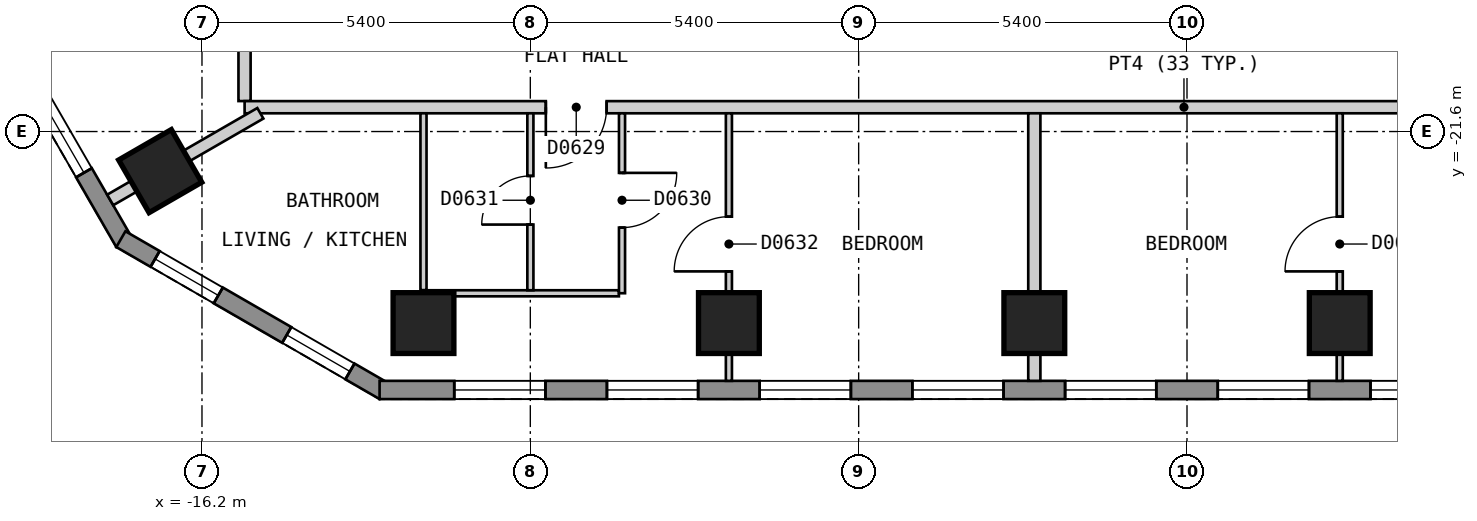
"""IFC4 building model, lengths in metres.
Left out: names, types, materials, properties, quantities, classifications, styles, units other than length and angle.
Written with IfcOpenShell. Run it as: python <this file> out.ifc"""

import sys

from ifc_helpers import new_model, si_unit, direction, frame, frame_2d, origin, origin_2d, place, context, subcontext, project, spatial, polyline, rectangle, outline, extrude, element, fill, save


model = new_model("IFC4")
c1 = context("Model", 3, precision=1e-05, world=origin(), true_north=direction((0.0, 1.0)))
c2 = subcontext(c1, "Body", "Model", "MODEL_VIEW")
j1 = project(units=[si_unit("LENGTHUNIT", "METRE"), si_unit("PLANEANGLEUNIT", "RADIAN")], contexts=[c1])
p1 = place(None, origin())
s1 = spatial("IfcSite", under=j1, at=p1, CompositionType="ELEMENT")
p2 = place(p1, origin())
s2 = spatial("IfcBuilding", under=s1, at=p2, CompositionType="ELEMENT")
p3 = place(p2, frame((0.0, 0.0, 81.0)))
s3 = spatial("IfcBuildingStorey", under=s2, at=p3, CompositionType="ELEMENT", Elevation=81.0)
for number, where, z_axis, x_axis in (
    (1, (-16.887, -22.251, 0.0), (0.0, 0.0, 1.0), (0.5, -0.866, 0.0)),
    (2, (-12.557, -24.75, 0.0), (0.0, 0.0, 1.0), (1.0, 0.0, 0.0)),
    (3, (-7.534, -24.75, 0.0), (0.0, 0.0, 1.0), (1.0, 0.0, 0.0)),
    (4, (-2.511, -24.75, 0.0), (0.0, 0.0, 1.0), (1.0, 0.0, 0.0)),
    (5, (2.512, -24.75, 0.0), (0.0, 0.0, 1.0), (1.0, 0.0, 0.0)),
):
    element("IfcColumn", number, at=place(p3, frame(where, z_axis=z_axis, x_axis=x_axis)), inside=s3, PredefinedType="COLUMN", context=c2, shape_type="SweptSolid", body=[
        extrude(rectangle(XDim=1.0, YDim=1.0, at=origin_2d()), origin(), (0.0, 0.0, 1.0), 3.0),
    ])
p4 = place(p3, frame((-29.027, -3.425, 0.0), z_axis=(0.0, 0.0, 1.0), x_axis=(0.500035407905, -0.866004960056, 0.0)))
e6 = element("IfcWall", 6, at=p4, inside=s3, PredefinedType="SOLIDWALL", context=c2, shape_type="SweptSolid", body=[
    extrude(outline(polyline([(0.0, -0.15), (23.094, -0.15), (23.014, 0.15), (0.08, 0.15), (0.0, -0.15)])), origin(), (0.0, 0.0, 1.0), 2.7),
])
p5 = place(p4, frame((1.324, 0.0, 0.15)))
e7 = element("IfcOpeningElement", 7, at=p5, cuts=e6, PredefinedType="OPENING", context=c2, shape_type="SweptSolid", body=[
    extrude(rectangle(XDim=1.5, YDim=2.1, at=frame_2d((0.75, 1.05))), frame((0.0, 0.16, 0.0), z_axis=(0.0, -1.0, 0.0), x_axis=(1.0, 0.0, 0.0)), (0.0, 0.0, 1.0), 0.32),
])
p6 = place(p4, frame((4.031, 0.0, 0.15)))
e8 = element("IfcOpeningElement", 8, at=p6, cuts=e6, PredefinedType="OPENING", context=c2, shape_type="SweptSolid", body=[
    extrude(rectangle(XDim=1.5, YDim=2.1, at=frame_2d((0.75, 1.05))), frame((0.0, 0.16, 0.0), z_axis=(0.0, -1.0, 0.0), x_axis=(1.0, 0.0, 0.0)), (0.0, 0.0, 1.0), 0.32),
])
p7 = place(p4, frame((6.737, 0.0, 0.15)))
e9 = element("IfcOpeningElement", 9, at=p7, cuts=e6, PredefinedType="OPENING", context=c2, shape_type="SweptSolid", body=[
    extrude(rectangle(XDim=1.5, YDim=2.1, at=frame_2d((0.75, 1.05))), frame((0.0, 0.16, 0.0), z_axis=(0.0, -1.0, 0.0), x_axis=(1.0, 0.0, 0.0)), (0.0, 0.0, 1.0), 0.32),
])
p8 = place(p4, frame((9.444, 0.0, 0.15)))
e10 = element("IfcOpeningElement", 10, at=p8, cuts=e6, PredefinedType="OPENING", context=c2, shape_type="SweptSolid", body=[
    extrude(rectangle(XDim=1.5, YDim=2.1, at=frame_2d((0.75, 1.05))), frame((0.0, 0.16, 0.0), z_axis=(0.0, -1.0, 0.0), x_axis=(1.0, 0.0, 0.0)), (0.0, 0.0, 1.0), 0.32),
])
p9 = place(p4, frame((12.151, 0.0, 0.15)))
e11 = element("IfcOpeningElement", 11, at=p9, cuts=e6, PredefinedType="OPENING", context=c2, shape_type="SweptSolid", body=[
    extrude(rectangle(XDim=1.5, YDim=2.1, at=frame_2d((0.75, 1.05))), frame((0.0, 0.16, 0.0), z_axis=(0.0, -1.0, 0.0), x_axis=(1.0, 0.0, 0.0)), (0.0, 0.0, 1.0), 0.32),
])
p10 = place(p4, frame((14.857, 0.0, 0.15)))
e12 = element("IfcOpeningElement", 12, at=p10, cuts=e6, PredefinedType="OPENING", context=c2, shape_type="SweptSolid", body=[
    extrude(rectangle(XDim=1.5, YDim=2.1, at=frame_2d((0.75, 1.05))), frame((0.0, 0.16, 0.0), z_axis=(0.0, -1.0, 0.0), x_axis=(1.0, 0.0, 0.0)), (0.0, 0.0, 1.0), 0.32),
])
p11 = place(p4, frame((17.564, 0.0, 0.15)))
e13 = element("IfcOpeningElement", 13, at=p11, cuts=e6, PredefinedType="OPENING", context=c2, shape_type="SweptSolid", body=[
    extrude(rectangle(XDim=1.5, YDim=2.1, at=frame_2d((0.75, 1.05))), frame((0.0, 0.16, 0.0), z_axis=(0.0, -1.0, 0.0), x_axis=(1.0, 0.0, 0.0)), (0.0, 0.0, 1.0), 0.32),
])
p12 = place(p4, frame((20.27, 0.0, 0.15)))
e14 = element("IfcOpeningElement", 14, at=p12, cuts=e6, PredefinedType="OPENING", context=c2, shape_type="SweptSolid", body=[
    extrude(rectangle(XDim=1.5, YDim=2.1, at=frame_2d((0.75, 1.05))), frame((0.0, 0.16, 0.0), z_axis=(0.0, -1.0, 0.0), x_axis=(1.0, 0.0, 0.0)), (0.0, 0.0, 1.0), 0.32),
])
p13 = place(p3, frame((-17.534, -23.37, 0.0), z_axis=(0.0, 0.0, 1.0), x_axis=(0.866010750942, -0.50002537861, 0.0)))
e15 = element("IfcWall", 15, at=p13, inside=s3, PredefinedType="SOLIDWALL", context=c2, shape_type="SweptSolid", body=[
    extrude(outline(polyline([(0.0, -0.15), (5.0, -0.15), (4.919, 0.15), (0.08, 0.15), (0.0, -0.15)])), origin(), (0.0, 0.0, 1.0), 2.7),
])
p14 = place(p13, frame((0.65, 0.0, 0.15)))
e16 = element("IfcOpeningElement", 16, at=p14, cuts=e15, PredefinedType="OPENING", context=c2, shape_type="SweptSolid", body=[
    extrude(rectangle(XDim=1.2, YDim=2.1, at=frame_2d((0.6, 1.05))), frame((0.0, 0.16, 0.0), z_axis=(0.0, -1.0, 0.0), x_axis=(1.0, 0.0, 0.0)), (0.0, 0.0, 1.0), 0.32),
])
p15 = place(p13, frame((3.15, 0.0, 0.15)))
e17 = element("IfcOpeningElement", 17, at=p15, cuts=e15, PredefinedType="OPENING", context=c2, shape_type="SweptSolid", body=[
    extrude(rectangle(XDim=1.2, YDim=2.1, at=frame_2d((0.6, 1.05))), frame((0.0, 0.16, 0.0), z_axis=(0.0, -1.0, 0.0), x_axis=(1.0, 0.0, 0.0)), (0.0, 0.0, 1.0), 0.32),
])
p16 = place(p3, frame((-13.279, -25.85, 0.0), z_axis=(0.0, 0.0, 1.0), x_axis=(1.0, 0.0, 0.0)))
e18 = element("IfcWall", 18, at=p16, inside=s3, PredefinedType="SOLIDWALL", context=c2, shape_type="SweptSolid", body=[
    extrude(outline(polyline([(0.0, -0.15), (26.558, -0.15), (26.478, 0.15), (0.08, 0.15), (0.0, -0.15)])), origin(), (0.0, 0.0, 1.0), 2.7),
])
p17 = place(p16, frame((1.228, 0.0, 0.15)))
e19 = element("IfcOpeningElement", 19, at=p17, cuts=e18, PredefinedType="OPENING", context=c2, shape_type="SweptSolid", body=[
    extrude(rectangle(XDim=1.5, YDim=2.1, at=frame_2d((0.75, 1.05))), frame((0.0, 0.16, 0.0), z_axis=(0.0, -1.0, 0.0), x_axis=(1.0, 0.0, 0.0)), (0.0, 0.0, 1.0), 0.32),
])
p18 = place(p16, frame((3.739, 0.0, 0.15)))
e20 = element("IfcOpeningElement", 20, at=p18, cuts=e18, PredefinedType="OPENING", context=c2, shape_type="SweptSolid", body=[
    extrude(rectangle(XDim=1.5, YDim=2.1, at=frame_2d((0.75, 1.05))), frame((0.0, 0.16, 0.0), z_axis=(0.0, -1.0, 0.0), x_axis=(1.0, 0.0, 0.0)), (0.0, 0.0, 1.0), 0.32),
])
p19 = place(p16, frame((6.251, 0.0, 0.15)))
e21 = element("IfcOpeningElement", 21, at=p19, cuts=e18, PredefinedType="OPENING", context=c2, shape_type="SweptSolid", body=[
    extrude(rectangle(XDim=1.5, YDim=2.1, at=frame_2d((0.75, 1.05))), frame((0.0, 0.16, 0.0), z_axis=(0.0, -1.0, 0.0), x_axis=(1.0, 0.0, 0.0)), (0.0, 0.0, 1.0), 0.32),
])
p20 = place(p16, frame((8.762, 0.0, 0.15)))
e22 = element("IfcOpeningElement", 22, at=p20, cuts=e18, PredefinedType="OPENING", context=c2, shape_type="SweptSolid", body=[
    extrude(rectangle(XDim=1.5, YDim=2.1, at=frame_2d((0.75, 1.05))), frame((0.0, 0.16, 0.0), z_axis=(0.0, -1.0, 0.0), x_axis=(1.0, 0.0, 0.0)), (0.0, 0.0, 1.0), 0.32),
])
p21 = place(p16, frame((11.274, 0.0, 0.15)))
e23 = element("IfcOpeningElement", 23, at=p21, cuts=e18, PredefinedType="OPENING", context=c2, shape_type="SweptSolid", body=[
    extrude(rectangle(XDim=1.5, YDim=2.1, at=frame_2d((0.75, 1.05))), frame((0.0, 0.16, 0.0), z_axis=(0.0, -1.0, 0.0), x_axis=(1.0, 0.0, 0.0)), (0.0, 0.0, 1.0), 0.32),
])
p22 = place(p16, frame((13.785, 0.0, 0.15)))
e24 = element("IfcOpeningElement", 24, at=p22, cuts=e18, PredefinedType="OPENING", context=c2, shape_type="SweptSolid", body=[
    extrude(rectangle(XDim=1.5, YDim=2.1, at=frame_2d((0.75, 1.05))), frame((0.0, 0.16, 0.0), z_axis=(0.0, -1.0, 0.0), x_axis=(1.0, 0.0, 0.0)), (0.0, 0.0, 1.0), 0.32),
])
p23 = place(p16, frame((16.297, 0.0, 0.15)))
e25 = element("IfcOpeningElement", 25, at=p23, cuts=e18, PredefinedType="OPENING", context=c2, shape_type="SweptSolid", body=[
    extrude(rectangle(XDim=1.5, YDim=2.1, at=frame_2d((0.75, 1.05))), frame((0.0, 0.16, 0.0), z_axis=(0.0, -1.0, 0.0), x_axis=(1.0, 0.0, 0.0)), (0.0, 0.0, 1.0), 0.32),
])
p24 = place(p16, frame((18.808, 0.0, 0.15)))
e26 = element("IfcOpeningElement", 26, at=p24, cuts=e18, PredefinedType="OPENING", context=c2, shape_type="SweptSolid", body=[
    extrude(rectangle(XDim=1.5, YDim=2.1, at=frame_2d((0.75, 1.05))), frame((0.0, 0.16, 0.0), z_axis=(0.0, -1.0, 0.0), x_axis=(1.0, 0.0, 0.0)), (0.0, 0.0, 1.0), 0.32),
])
p25 = place(p16, frame((21.32, 0.0, 0.15)))
e27 = element("IfcOpeningElement", 27, at=p25, cuts=e18, PredefinedType="OPENING", context=c2, shape_type="SweptSolid", body=[
    extrude(rectangle(XDim=1.5, YDim=2.1, at=frame_2d((0.75, 1.05))), frame((0.0, 0.16, 0.0), z_axis=(0.0, -1.0, 0.0), x_axis=(1.0, 0.0, 0.0)), (0.0, 0.0, 1.0), 0.32),
])
p26 = place(p16, frame((23.831, 0.0, 0.15)))
e28 = element("IfcOpeningElement", 28, at=p26, cuts=e18, PredefinedType="OPENING", context=c2, shape_type="SweptSolid", body=[
    extrude(rectangle(XDim=1.5, YDim=2.1, at=frame_2d((0.75, 1.05))), frame((0.0, 0.16, 0.0), z_axis=(0.0, -1.0, 0.0), x_axis=(1.0, 0.0, 0.0)), (0.0, 0.0, 1.0), 0.32),
])
p27 = place(p3, frame((-15.5, -16.501, 0.0), z_axis=(0.0, 0.0, 1.0), x_axis=(0.0, -1.0, 0.0)))
e29 = element("IfcWall", 29, at=p27, inside=s3, PredefinedType="PARTITIONING", context=c2, shape_type="SweptSolid", body=[
    extrude(rectangle(XDim=4.598, YDim=0.2, at=frame_2d((2.299, 0.0))), origin(), (0.0, 0.0, 1.0), 2.7),
])
p28 = place(p3, frame((-15.499, -21.2, 0.0), z_axis=(0.0, 0.0, 1.0), x_axis=(1.0, 0.0, 0.0)))
e30 = element("IfcWall", 30, at=p28, inside=s3, PredefinedType="PARTITIONING", context=c2, shape_type="SweptSolid", body=[
    extrude(rectangle(XDim=30.898, YDim=0.2, at=frame_2d((15.449, 0.0))), origin(), (0.0, 0.0, 1.0), 2.7),
])
p29 = place(p28, frame((4.954, 0.0, 0.0)))
e31 = element("IfcOpeningElement", 31, at=p29, cuts=e30, PredefinedType="OPENING", context=c2, shape_type="SweptSolid", body=[
    extrude(rectangle(XDim=1.0, YDim=2.1, at=frame_2d((0.5, 1.05))), frame((0.0, 0.11, 0.0), z_axis=(0.0, -1.0, 0.0), x_axis=(1.0, 0.0, 0.0)), (0.0, 0.0, 1.0), 0.22),
])
p30 = place(p28, frame((25.046, 0.0, 0.0)))
e32 = element("IfcOpeningElement", 32, at=p30, cuts=e30, PredefinedType="OPENING", context=c2, shape_type="SweptSolid", body=[
    extrude(rectangle(XDim=1.0, YDim=2.1, at=frame_2d((0.5, 1.05))), frame((0.0, 0.11, 0.0), z_axis=(0.0, -1.0, 0.0), x_axis=(1.0, 0.0, 0.0)), (0.0, 0.0, 1.0), 0.22),
])
p31 = place(p3, frame((-7.534, -21.3, 0.0), z_axis=(0.0, 0.0, 1.0), x_axis=(0.0, -1.0, 0.0)))
e33 = element("IfcWall", 33, at=p31, inside=s3, PredefinedType="PARTITIONING", context=c2, shape_type="SweptSolid", body=[
    extrude(rectangle(XDim=4.4, YDim=0.1, at=frame_2d((2.2, 0.0))), origin(), (0.0, 0.0, 1.0), 2.7),
])
p32 = place(p31, frame((1.7, 0.0, 0.0)))
e34 = element("IfcOpeningElement", 34, at=p32, cuts=e33, PredefinedType="OPENING", context=c2, shape_type="SweptSolid", body=[
    extrude(rectangle(XDim=0.9, YDim=2.1, at=frame_2d((0.45, 1.05))), frame((0.0, 0.06, 0.0), z_axis=(0.0, -1.0, 0.0), x_axis=(1.0, 0.0, 0.0)), (0.0, 0.0, 1.0), 0.12),
])
p33 = place(p3, frame((-12.557, -21.3, 0.0), z_axis=(0.0, 0.0, 1.0), x_axis=(0.0, -1.0, 0.0)))
e35 = element("IfcWall", 35, at=p33, inside=s3, PredefinedType="PARTITIONING", context=c2, shape_type="SweptSolid", body=[
    extrude(rectangle(XDim=2.909, YDim=0.1, at=frame_2d((1.455, 0.0))), origin(), (0.0, 0.0, 1.0), 2.7),
])
p34 = place(p3, frame((-12.556, -24.26, 0.0), z_axis=(0.0, 0.0, 1.0), x_axis=(1.0, 0.0, 0.0)))
e36 = element("IfcWall", 36, at=p34, inside=s3, PredefinedType="PARTITIONING", context=c2, shape_type="SweptSolid", body=[
    extrude(rectangle(XDim=3.213, YDim=0.1, at=frame_2d((1.606, 0.0))), origin(), (0.0, 0.0, 1.0), 2.7),
])
p35 = place(p3, frame((2.512, -25.7, 0.0), z_axis=(0.0, 0.0, 1.0), x_axis=(0.0, 1.0, 0.0)))
e37 = element("IfcWall", 37, at=p35, inside=s3, PredefinedType="PARTITIONING", context=c2, shape_type="SweptSolid", body=[
    extrude(rectangle(XDim=4.4, YDim=0.1, at=frame_2d((2.2, 0.0))), origin(), (0.0, 0.0, 1.0), 2.7),
])
p36 = place(p35, frame((1.8, 0.0, 0.0)))
e38 = element("IfcOpeningElement", 38, at=p36, cuts=e37, PredefinedType="OPENING", context=c2, shape_type="SweptSolid", body=[
    extrude(rectangle(XDim=0.9, YDim=2.1, at=frame_2d((0.45, 1.05))), frame((0.0, 0.06, 0.0), z_axis=(0.0, -1.0, 0.0), x_axis=(1.0, 0.0, 0.0)), (0.0, 0.0, 1.0), 0.12),
])
p37 = place(p3, frame((-9.292, -24.259, 0.0), z_axis=(0.0, 0.0, 1.0), x_axis=(0.0, 1.0, 0.0)))
e39 = element("IfcWall", 39, at=p37, inside=s3, PredefinedType="PARTITIONING", context=c2, shape_type="SweptSolid", body=[
    extrude(rectangle(XDim=2.959, YDim=0.1, at=frame_2d((1.479, 0.0))), origin(), (0.0, 0.0, 1.0), 2.7),
])
p38 = place(p37, frame((1.079, 0.0, 0.0)))
e40 = element("IfcOpeningElement", 40, at=p38, cuts=e39, PredefinedType="OPENING", context=c2, shape_type="SweptSolid", body=[
    extrude(rectangle(XDim=0.9, YDim=2.1, at=frame_2d((0.45, 1.05))), frame((0.0, 0.06, 0.0), z_axis=(0.0, -1.0, 0.0), x_axis=(1.0, 0.0, 0.0)), (0.0, 0.0, 1.0), 0.12),
])
p39 = place(p3, frame((-10.799, -24.21, 0.0), z_axis=(0.0, 0.0, 1.0), x_axis=(0.0, 1.0, 0.0)))
e41 = element("IfcWall", 41, at=p39, inside=s3, PredefinedType="PARTITIONING", context=c2, shape_type="SweptSolid", body=[
    extrude(rectangle(XDim=2.91, YDim=0.1, at=frame_2d((1.455, 0.0))), origin(), (0.0, 0.0, 1.0), 2.7),
])
p40 = place(p39, frame((1.08, 0.0, 0.0)))
e42 = element("IfcOpeningElement", 42, at=p40, cuts=e41, PredefinedType="OPENING", context=c2, shape_type="SweptSolid", body=[
    extrude(rectangle(XDim=0.8, YDim=2.1, at=frame_2d((0.4, 1.05))), frame((0.0, 0.06, 0.0), z_axis=(0.0, -1.0, 0.0), x_axis=(1.0, 0.0, 0.0)), (0.0, 0.0, 1.0), 0.12),
])
p41 = place(p3, frame((-2.511, -25.7, 0.0), z_axis=(0.0, 0.0, 1.0), x_axis=(0.0, 1.0, 0.0)))
e43 = element("IfcWall", 43, at=p41, inside=s3, PredefinedType="PARTITIONING", context=c2, shape_type="SweptSolid", body=[
    extrude(rectangle(XDim=4.4, YDim=0.2, at=frame_2d((2.2, 0.0))), origin(), (0.0, 0.0, 1.0), 2.7),
])
p42 = place(p3, frame((-17.709, -22.725, 0.0), z_axis=(0.0, 0.0, 1.0), x_axis=(0.866090043625, 0.499888023795, 0.0)))
e44 = element("IfcWall", 44, at=p42, inside=s3, PredefinedType="PARTITIONING", context=c2, shape_type="SweptSolid", body=[
    extrude(rectangle(XDim=2.851, YDim=0.2, at=frame_2d((1.425, 0.0))), origin(), (0.0, 0.0, 1.0), 2.7),
])
p43 = place(p12, origin())
e45 = element("IfcWindow", 45, at=p43, inside=s3, PartitioningType="SINGLE_PANEL", PredefinedType="WINDOW", context=c2, shape_type="SweptSolid", body=[
    extrude(rectangle(XDim=1.5, YDim=2.1, at=frame_2d((0.75, 1.05))), frame((0.0, 0.03, 0.0), z_axis=(0.0, -1.0, 0.0), x_axis=(1.0, 0.0, 0.0)), (0.0, 0.0, 1.0), 0.06),
])
fill(e14, e45)
p44 = place(p14, origin())
e46 = element("IfcWindow", 46, at=p44, inside=s3, PartitioningType="SINGLE_PANEL", PredefinedType="WINDOW", context=c2, shape_type="SweptSolid", body=[
    extrude(rectangle(XDim=1.2, YDim=2.1, at=frame_2d((0.6, 1.05))), frame((0.0, 0.03, 0.0), z_axis=(0.0, -1.0, 0.0), x_axis=(1.0, 0.0, 0.0)), (0.0, 0.0, 1.0), 0.06),
])
fill(e16, e46)
p45 = place(p15, origin())
e47 = element("IfcWindow", 47, at=p45, inside=s3, PartitioningType="SINGLE_PANEL", PredefinedType="WINDOW", context=c2, shape_type="SweptSolid", body=[
    extrude(rectangle(XDim=1.2, YDim=2.1, at=frame_2d((0.6, 1.05))), frame((0.0, 0.03, 0.0), z_axis=(0.0, -1.0, 0.0), x_axis=(1.0, 0.0, 0.0)), (0.0, 0.0, 1.0), 0.06),
])
fill(e17, e47)
p46 = place(p17, origin())
e48 = element("IfcWindow", 48, at=p46, inside=s3, PartitioningType="SINGLE_PANEL", PredefinedType="WINDOW", context=c2, shape_type="SweptSolid", body=[
    extrude(rectangle(XDim=1.5, YDim=2.1, at=frame_2d((0.75, 1.05))), frame((0.0, 0.03, 0.0), z_axis=(0.0, -1.0, 0.0), x_axis=(1.0, 0.0, 0.0)), (0.0, 0.0, 1.0), 0.06),
])
fill(e19, e48)
p47 = place(p18, origin())
e49 = element("IfcWindow", 49, at=p47, inside=s3, PartitioningType="SINGLE_PANEL", PredefinedType="WINDOW", context=c2, shape_type="SweptSolid", body=[
    extrude(rectangle(XDim=1.5, YDim=2.1, at=frame_2d((0.75, 1.05))), frame((0.0, 0.03, 0.0), z_axis=(0.0, -1.0, 0.0), x_axis=(1.0, 0.0, 0.0)), (0.0, 0.0, 1.0), 0.06),
])
fill(e20, e49)
p48 = place(p19, origin())
e50 = element("IfcWindow", 50, at=p48, inside=s3, PartitioningType="SINGLE_PANEL", PredefinedType="WINDOW", context=c2, shape_type="SweptSolid", body=[
    extrude(rectangle(XDim=1.5, YDim=2.1, at=frame_2d((0.75, 1.05))), frame((0.0, 0.03, 0.0), z_axis=(0.0, -1.0, 0.0), x_axis=(1.0, 0.0, 0.0)), (0.0, 0.0, 1.0), 0.06),
])
fill(e21, e50)
p49 = place(p20, origin())
e51 = element("IfcWindow", 51, at=p49, inside=s3, PartitioningType="SINGLE_PANEL", PredefinedType="WINDOW", context=c2, shape_type="SweptSolid", body=[
    extrude(rectangle(XDim=1.5, YDim=2.1, at=frame_2d((0.75, 1.05))), frame((0.0, 0.03, 0.0), z_axis=(0.0, -1.0, 0.0), x_axis=(1.0, 0.0, 0.0)), (0.0, 0.0, 1.0), 0.06),
])
fill(e22, e51)
p50 = place(p21, origin())
e52 = element("IfcWindow", 52, at=p50, inside=s3, PartitioningType="SINGLE_PANEL", PredefinedType="WINDOW", context=c2, shape_type="SweptSolid", body=[
    extrude(rectangle(XDim=1.5, YDim=2.1, at=frame_2d((0.75, 1.05))), frame((0.0, 0.03, 0.0), z_axis=(0.0, -1.0, 0.0), x_axis=(1.0, 0.0, 0.0)), (0.0, 0.0, 1.0), 0.06),
])
fill(e23, e52)
p51 = place(p22, origin())
e53 = element("IfcWindow", 53, at=p51, inside=s3, PartitioningType="SINGLE_PANEL", PredefinedType="WINDOW", context=c2, shape_type="SweptSolid", body=[
    extrude(rectangle(XDim=1.5, YDim=2.1, at=frame_2d((0.75, 1.05))), frame((0.0, 0.03, 0.0), z_axis=(0.0, -1.0, 0.0), x_axis=(1.0, 0.0, 0.0)), (0.0, 0.0, 1.0), 0.06),
])
fill(e24, e53)
p52 = place(p23, origin())
e54 = element("IfcWindow", 54, at=p52, inside=s3, PartitioningType="SINGLE_PANEL", PredefinedType="WINDOW", context=c2, shape_type="SweptSolid", body=[
    extrude(rectangle(XDim=1.5, YDim=2.1, at=frame_2d((0.75, 1.05))), frame((0.0, 0.03, 0.0), z_axis=(0.0, -1.0, 0.0), x_axis=(1.0, 0.0, 0.0)), (0.0, 0.0, 1.0), 0.06),
])
fill(e25, e54)
p53 = place(p29, origin())
e55 = element("IfcDoor", 55, at=p53, inside=s3, OperationType="SINGLE_SWING_LEFT", PredefinedType="DOOR", context=c2, shape_type="SweptSolid", body=[
    extrude(rectangle(XDim=1.0, YDim=2.1, at=frame_2d((0.5, 1.05))), frame((0.0, 0.025, 0.0), z_axis=(0.0, -1.0, 0.0), x_axis=(1.0, 0.0, 0.0)), (0.0, 0.0, 1.0), 0.05),
])
fill(e31, e55)
p54 = place(p38, origin())
e56 = element("IfcDoor", 56, at=p54, inside=s3, OperationType="SINGLE_SWING_RIGHT", PredefinedType="DOOR", context=c2, shape_type="SweptSolid", body=[
    extrude(rectangle(XDim=0.9, YDim=2.1, at=frame_2d((0.45, 1.05))), frame((0.0, 0.025, 0.0), z_axis=(0.0, -1.0, 0.0), x_axis=(1.0, 0.0, 0.0)), (0.0, 0.0, 1.0), 0.05),
])
fill(e40, e56)
p55 = place(p40, origin())
e57 = element("IfcDoor", 57, at=p55, inside=s3, OperationType="SINGLE_SWING_LEFT", PredefinedType="DOOR", context=c2, shape_type="SweptSolid", body=[
    extrude(rectangle(XDim=0.8, YDim=2.1, at=frame_2d((0.4, 1.05))), frame((0.0, 0.025, 0.0), z_axis=(0.0, -1.0, 0.0), x_axis=(1.0, 0.0, 0.0)), (0.0, 0.0, 1.0), 0.05),
])
fill(e42, e57)
p56 = place(p32, origin())
e58 = element("IfcDoor", 58, at=p56, inside=s3, OperationType="SINGLE_SWING_RIGHT", PredefinedType="DOOR", context=c2, shape_type="SweptSolid", body=[
    extrude(rectangle(XDim=0.9, YDim=2.1, at=frame_2d((0.45, 1.05))), frame((0.0, 0.025, 0.0), z_axis=(0.0, -1.0, 0.0), x_axis=(1.0, 0.0, 0.0)), (0.0, 0.0, 1.0), 0.05),
])
fill(e34, e58)
p57 = place(p36, origin())
e59 = element("IfcDoor", 59, at=p57, inside=s3, OperationType="SINGLE_SWING_LEFT", PredefinedType="DOOR", context=c2, shape_type="SweptSolid", body=[
    extrude(rectangle(XDim=0.9, YDim=2.1, at=frame_2d((0.45, 1.05))), frame((0.0, 0.025, 0.0), z_axis=(0.0, -1.0, 0.0), x_axis=(1.0, 0.0, 0.0)), (0.0, 0.0, 1.0), 0.05),
])
fill(e38, e59)
save(model, sys.argv[1])
